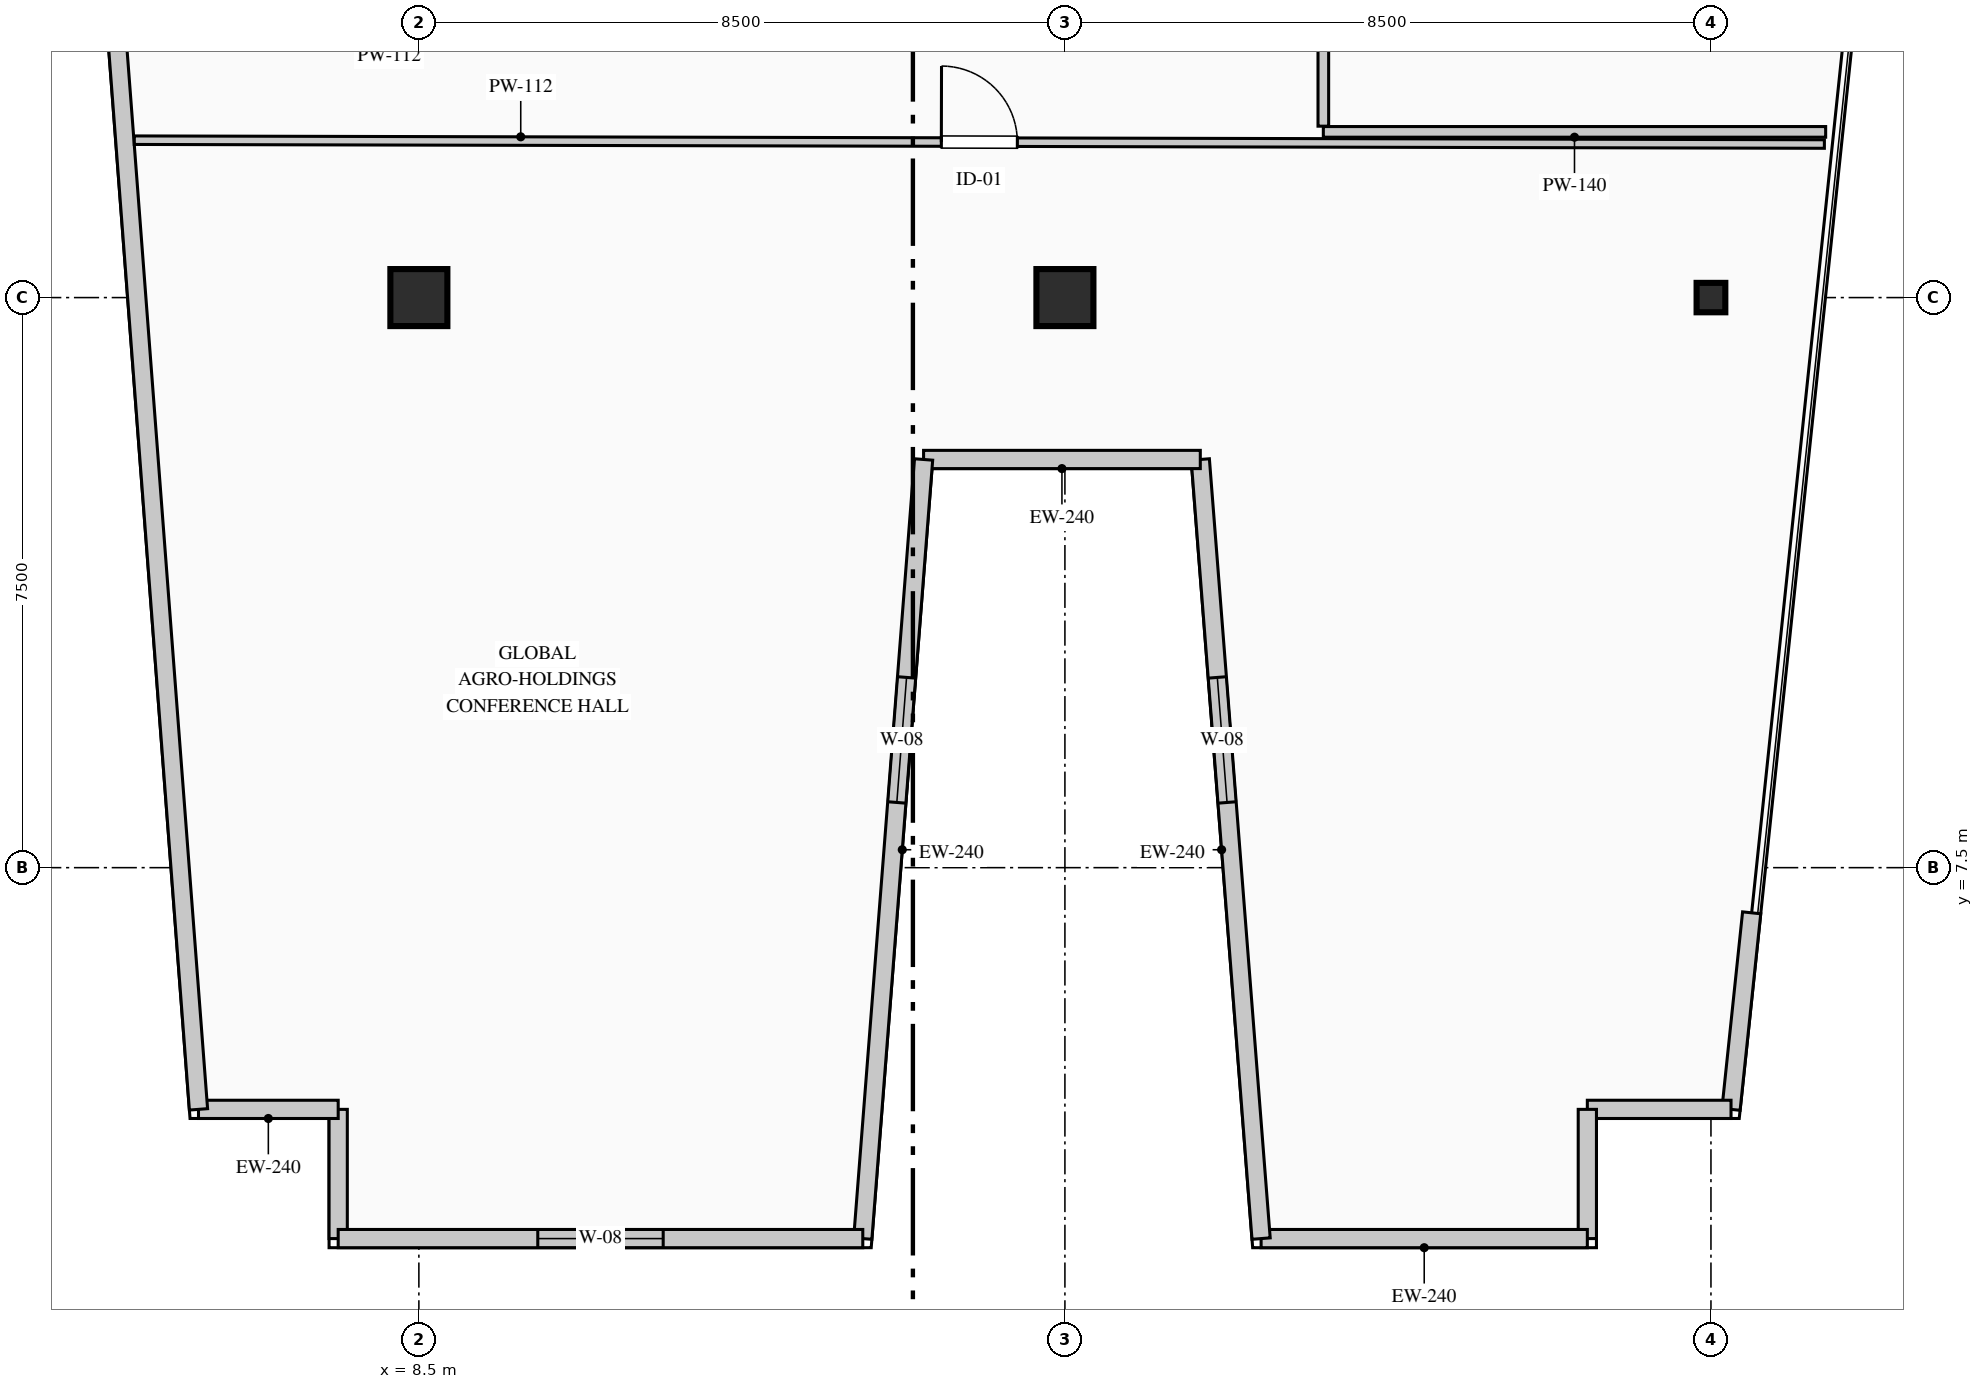
"""IFC4 building model, lengths in metres.
Left out: names, types, materials, properties, quantities, classifications, styles, units other than length and angle.
Written with IfcOpenShell. Run it as: python <this file> out.ifc"""

import sys

from ifc_helpers import new_model, si_unit, direction, frame, frame_2d, origin, origin_2d, place, context, subcontext, project, spatial, rectangle, i_section, extrude, element, fill, save


model = new_model("IFC4")
c1 = context("Model", 3, precision=1e-05, world=origin(), true_north=direction((0.0, 1.0)))
c2 = subcontext(c1, "Body", "Model", "MODEL_VIEW")
j1 = project(units=[si_unit("LENGTHUNIT", "METRE"), si_unit("PLANEANGLEUNIT", "RADIAN")], contexts=[c1])
p1 = place(None, origin())
s1 = spatial("IfcSite", under=j1, at=p1, CompositionType="ELEMENT")
p2 = place(p1, origin())
s2 = spatial("IfcBuilding", under=s1, at=p2, CompositionType="ELEMENT")
p3 = place(p2, frame((0.0, 0.0, 292.25)))
s3 = spatial("IfcBuildingStorey", under=s2, at=p3, CompositionType="ELEMENT", Elevation=292.25)
for number, where, z_axis, x_axis in (
    (1, (8.5, 15.0, 0.0), (0.0, 0.0, 1.0), (1.0, 0.0, 0.0)),
    (2, (17.0, 15.0, 0.0), (0.0, 0.0, 1.0), (1.0, 0.0, 0.0)),
):
    element("IfcColumn", number, at=place(p3, frame(where, z_axis=z_axis, x_axis=x_axis)), inside=s3, PredefinedType="COLUMN", context=c2, shape_type="SweptSolid", body=[
        extrude(rectangle(XDim=0.75, YDim=0.75, at=origin_2d()), origin(), (0.0, 0.0, 1.0), 3.95),
    ])
p4 = place(p3, frame((25.5, 15.0, 0.0), z_axis=(0.0, 0.0, 1.0), x_axis=(1.0, 0.0, 0.0)))
e3 = element("IfcColumn", 3, at=p4, inside=s3, PredefinedType="COLUMN", context=c2, shape_type="SweptSolid", body=[
    extrude(i_section(OverallWidth=0.378, OverallDepth=0.387, WebThickness=0.022, FlangeThickness=0.037, FilletRadius=0.015, at=origin_2d()), origin(), (0.0, 0.0, 1.0), 3.95),
])
p5 = place(p3, frame((7.438, 2.62, 0.0), z_axis=(0.0, 0.0, 1.0), x_axis=(0.0, 1.0, 0.0)))
e4 = element("IfcWall", 4, at=p5, inside=s3, PredefinedType="STANDARD", context=c2, shape_type="SweptSolid", body=[
    extrude(rectangle(XDim=1.7, YDim=0.24, at=frame_2d((0.85, 0.0))), origin(), (0.0, 0.0, 1.0), 3.7),
])
p6 = place(p3, frame((7.438, 4.32, 0.0), z_axis=(0.0, 0.0, 1.0), x_axis=(-1.0, 0.0, 0.0)))
e5 = element("IfcWall", 5, at=p6, inside=s3, PredefinedType="STANDARD", context=c2, shape_type="SweptSolid", body=[
    extrude(rectangle(XDim=1.838, YDim=0.24, at=frame_2d((0.919, 0.0))), origin(), (0.0, 0.0, 1.0), 3.7),
])
p7 = place(p3, frame((5.6, 4.32, 0.0), z_axis=(0.0, 0.0, 1.0), x_axis=(-0.075839920993, 0.997120006009, 0.0)))
e6 = element("IfcWall", 6, at=p7, inside=s3, PredefinedType="STANDARD", context=c2, shape_type="SweptSolid", body=[
    extrude(rectangle(XDim=37.468, YDim=0.24, at=frame_2d((18.734, 0.0))), origin(), (0.0, 0.0, 1.0), 3.7),
])
p8 = place(p7, frame((23.154, 0.0, 0.9)))
e7 = element("IfcOpeningElement", 7, at=p8, cuts=e6, PredefinedType="OPENING", context=c2, shape_type="SweptSolid", body=[
    extrude(rectangle(XDim=1.65, YDim=1.95, at=frame_2d((0.825, 0.975))), frame((0.0, 0.13, 0.0), z_axis=(0.0, -1.0, 0.0), x_axis=(1.0, 0.0, 0.0)), (0.0, 0.0, 1.0), 0.26),
])
p9 = place(p3, frame((26.036, 6.906, 0.0), z_axis=(0.0, 0.0, 1.0), x_axis=(-0.104513699976, -0.994523446942, 0.0)))
e8 = element("IfcWall", 8, at=p9, inside=s3, PredefinedType="STANDARD", context=c2, shape_type="SweptSolid", body=[
    extrude(rectangle(XDim=2.6, YDim=0.24, at=frame_2d((1.3, 0.0))), origin(), (0.0, 0.0, 1.0), 3.7),
])
p10 = place(p3, frame((25.764, 4.32, 0.0), z_axis=(0.0, 0.0, 1.0), x_axis=(-1.0, 0.0, 0.0)))
e9 = element("IfcWall", 9, at=p10, inside=s3, PredefinedType="STANDARD", context=c2, shape_type="SweptSolid", body=[
    extrude(rectangle(XDim=1.89, YDim=0.24, at=frame_2d((0.945, 0.0))), origin(), (0.0, 0.0, 1.0), 3.7),
])
p11 = place(p3, frame((23.874, 4.32, 0.0), z_axis=(0.0, 0.0, 1.0), x_axis=(0.0, -1.0, 0.0)))
e10 = element("IfcWall", 10, at=p11, inside=s3, PredefinedType="STANDARD", context=c2, shape_type="SweptSolid", body=[
    extrude(rectangle(XDim=1.7, YDim=0.24, at=frame_2d((0.85, 0.0))), origin(), (0.0, 0.0, 1.0), 3.7),
])
p12 = place(p3, frame((23.874, 2.62, 0.0), z_axis=(0.0, 0.0, 1.0), x_axis=(-1.0, 0.0, 0.0)))
e11 = element("IfcWall", 11, at=p12, inside=s3, PredefinedType="STANDARD", context=c2, shape_type="SweptSolid", body=[
    extrude(rectangle(XDim=4.292, YDim=0.24, at=frame_2d((2.146, 0.0))), origin(), (0.0, 0.0, 1.0), 3.7),
])
p13 = place(p3, frame((19.581, 2.62, 0.0), z_axis=(0.0, 0.0, 1.0), x_axis=(-0.077816860153, 0.996967670627, 0.0)))
e12 = element("IfcWall", 12, at=p13, inside=s3, PredefinedType="STANDARD", context=c2, shape_type="SweptSolid", body=[
    extrude(rectangle(XDim=10.281, YDim=0.24, at=frame_2d((5.141, 0.0))), origin(), (0.0, 0.0, 1.0), 3.7),
])
p14 = place(p13, frame((5.755, 0.0, 0.9)))
e13 = element("IfcOpeningElement", 13, at=p14, cuts=e12, PredefinedType="OPENING", context=c2, shape_type="SweptSolid", body=[
    extrude(rectangle(XDim=1.65, YDim=1.95, at=frame_2d((0.825, 0.975))), frame((0.0, 0.13, 0.0), z_axis=(0.0, -1.0, 0.0), x_axis=(1.0, 0.0, 0.0)), (0.0, 0.0, 1.0), 0.26),
])
p15 = place(p3, frame((18.781, 12.87, 0.0), z_axis=(0.0, 0.0, 1.0), x_axis=(-1.0, 0.0, 0.0)))
e14 = element("IfcWall", 14, at=p15, inside=s3, PredefinedType="STANDARD", context=c2, shape_type="SweptSolid", body=[
    extrude(rectangle(XDim=3.641, YDim=0.24, at=frame_2d((1.82, 0.0))), origin(), (0.0, 0.0, 1.0), 3.7),
])
p16 = place(p3, frame((15.14, 12.87, 0.0), z_axis=(0.0, 0.0, 1.0), x_axis=(-0.077793257511, -0.996969512616, 0.0)))
e15 = element("IfcWall", 15, at=p16, inside=s3, PredefinedType="STANDARD", context=c2, shape_type="SweptSolid", body=[
    extrude(rectangle(XDim=10.281, YDim=0.24, at=frame_2d((5.141, 0.0))), origin(), (0.0, 0.0, 1.0), 3.7),
])
p17 = place(p16, frame((2.876, 0.0, 0.9)))
e16 = element("IfcOpeningElement", 16, at=p17, cuts=e15, PredefinedType="OPENING", context=c2, shape_type="SweptSolid", body=[
    extrude(rectangle(XDim=1.65, YDim=1.95, at=frame_2d((0.825, 0.975))), frame((0.0, 0.13, 0.0), z_axis=(0.0, -1.0, 0.0), x_axis=(1.0, 0.0, 0.0)), (0.0, 0.0, 1.0), 0.26),
])
p18 = place(p3, frame((14.341, 2.62, 0.0), z_axis=(0.0, 0.0, 1.0), x_axis=(-1.0, 0.0, 0.0)))
e17 = element("IfcWall", 17, at=p18, inside=s3, PredefinedType="STANDARD", context=c2, shape_type="SweptSolid", body=[
    extrude(rectangle(XDim=6.902, YDim=0.24, at=frame_2d((3.451, 0.0))), origin(), (0.0, 0.0, 1.0), 3.7),
])
p19 = place(p18, frame((2.626, 0.0, 0.9)))
e18 = element("IfcOpeningElement", 18, at=p19, cuts=e17, PredefinedType="OPENING", context=c2, shape_type="SweptSolid", body=[
    extrude(rectangle(XDim=1.65, YDim=1.95, at=frame_2d((0.825, 0.975))), frame((0.0, 0.13, 0.0), z_axis=(0.0, -1.0, 0.0), x_axis=(1.0, 0.0, 0.0)), (0.0, 0.0, 1.0), 0.26),
])
p20 = place(p3, frame((27.009, 17.18, 0.0), z_axis=(0.0, 0.0, 1.0), x_axis=(-1.0, 0.0, 0.0)))
e19 = element("IfcWall", 19, at=p20, inside=s3, PredefinedType="PARTITIONING", context=c2, shape_type="SweptSolid", body=[
    extrude(rectangle(XDim=6.609, YDim=0.14, at=frame_2d((3.305, 0.0))), origin(), (0.0, 0.0, 1.0), 3.7),
])
p21 = place(p3, frame((20.4, 17.255, 0.0), z_axis=(0.0, 0.0, 1.0), x_axis=(0.0, 1.0, 0.0)))
e20 = element("IfcWall", 20, at=p21, inside=s3, PredefinedType="PARTITIONING", context=c2, shape_type="SweptSolid", body=[
    extrude(rectangle(XDim=3.995, YDim=0.14, at=frame_2d((1.998, 0.0))), origin(), (0.0, 0.0, 1.0), 3.7),
])
p22 = place(p21, frame((1.522, 0.0, 0.0)))
e21 = element("IfcOpeningElement", 21, at=p22, cuts=e20, PredefinedType="OPENING", context=c2, shape_type="SweptSolid", body=[
    extrude(rectangle(XDim=0.95, YDim=2.15, at=frame_2d((0.475, 1.075))), frame((0.0, 0.08, 0.0), z_axis=(0.0, -1.0, 0.0), x_axis=(1.0, 0.0, 0.0)), (0.0, 0.0, 1.0), 0.16),
])
p23 = place(p3, frame((4.756, 17.071, 0.0), z_axis=(0.0, 0.0, 1.0), x_axis=(0.999997417422, -0.00227269645, 0.0)))
e22 = element("IfcWall", 22, at=p23, inside=s3, PredefinedType="PARTITIONING", context=c2, shape_type="SweptSolid", body=[
    extrude(rectangle(XDim=22.237, YDim=0.112, at=frame_2d((11.118, 0.0))), origin(), (0.0, 0.0, 1.0), 3.7),
])
p24 = place(p23, frame((10.618, 0.0, 0.0)))
e23 = element("IfcOpeningElement", 23, at=p24, cuts=e22, PredefinedType="OPENING", context=c2, shape_type="SweptSolid", body=[
    extrude(rectangle(XDim=1.0, YDim=2.15, at=frame_2d((0.5, 1.075))), frame((0.0, 0.066, 0.0), z_axis=(0.0, -1.0, 0.0), x_axis=(1.0, 0.0, 0.0)), (0.0, 0.0, 1.0), 0.132),
])
p25 = place(p14, origin())
e24 = element("IfcWindow", 24, at=p25, inside=s3, PartitioningType="SINGLE_PANEL", PredefinedType="WINDOW", context=c2, shape_type="SweptSolid", body=[
    extrude(rectangle(XDim=1.65, YDim=1.95, at=frame_2d((0.825, 0.975))), frame((0.0, 0.03, 0.0), z_axis=(0.0, -1.0, 0.0), x_axis=(1.0, 0.0, 0.0)), (0.0, 0.0, 1.0), 0.06),
])
fill(e13, e24)
p26 = place(p17, origin())
e25 = element("IfcWindow", 25, at=p26, inside=s3, PartitioningType="SINGLE_PANEL", PredefinedType="WINDOW", context=c2, shape_type="SweptSolid", body=[
    extrude(rectangle(XDim=1.65, YDim=1.95, at=frame_2d((0.825, 0.975))), frame((0.0, 0.03, 0.0), z_axis=(0.0, -1.0, 0.0), x_axis=(1.0, 0.0, 0.0)), (0.0, 0.0, 1.0), 0.06),
])
fill(e16, e25)
p27 = place(p19, origin())
e26 = element("IfcWindow", 26, at=p27, inside=s3, PartitioningType="SINGLE_PANEL", PredefinedType="WINDOW", context=c2, shape_type="SweptSolid", body=[
    extrude(rectangle(XDim=1.65, YDim=1.95, at=frame_2d((0.825, 0.975))), frame((0.0, 0.03, 0.0), z_axis=(0.0, -1.0, 0.0), x_axis=(1.0, 0.0, 0.0)), (0.0, 0.0, 1.0), 0.06),
])
fill(e18, e26)
p28 = place(p24, origin())
e27 = element("IfcDoor", 27, at=p28, inside=s3, OperationType="SINGLE_SWING_LEFT", PredefinedType="DOOR", context=c2, shape_type="SweptSolid", body=[
    extrude(rectangle(XDim=1.0, YDim=2.15, at=frame_2d((0.5, 1.075))), frame((0.0, 0.025, 0.0), z_axis=(0.0, -1.0, 0.0), x_axis=(1.0, 0.0, 0.0)), (0.0, 0.0, 1.0), 0.05),
])
fill(e23, e27)
save(model, sys.argv[1])
